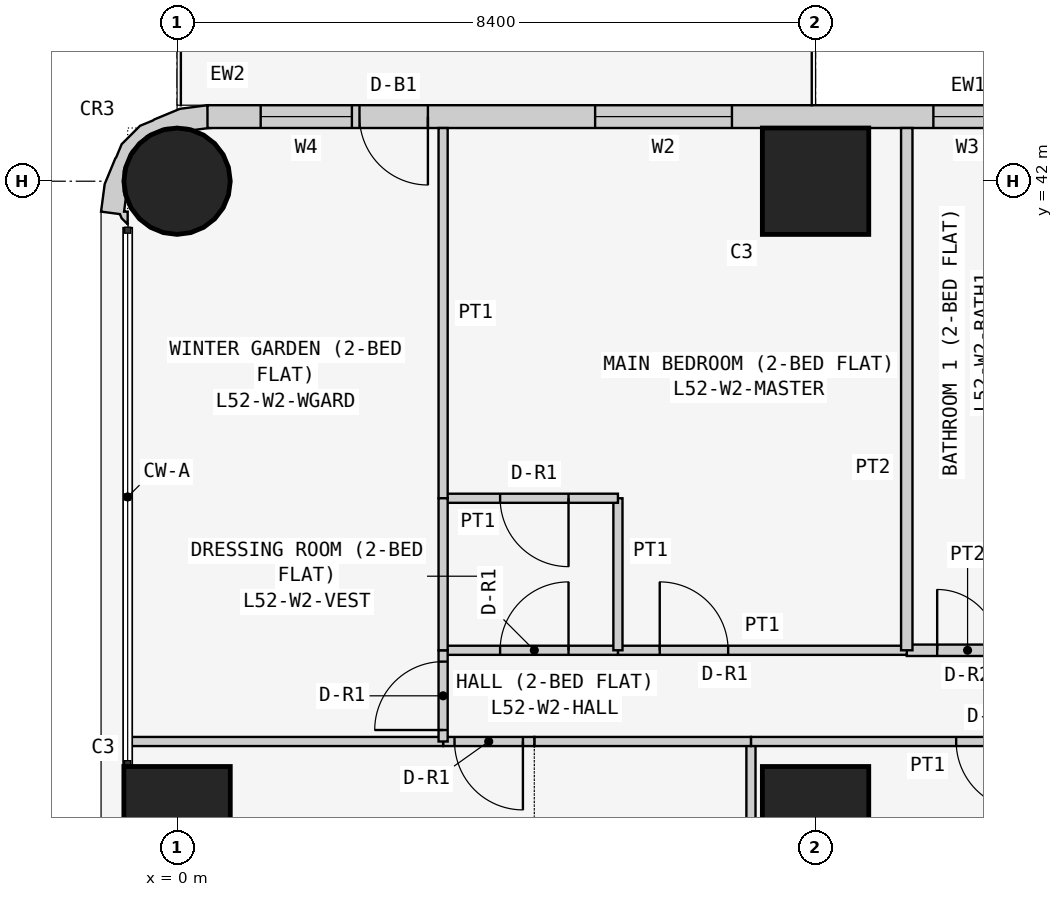
"""IFC4 building model, lengths in metres.
Left out: names, types, materials, properties, quantities, classifications, styles, units other than length and angle.
Written with IfcOpenShell. Run it as: python <this file> out.ifc"""

import sys

from ifc_helpers import new_model, si_unit, direction, frame, frame_2d, origin, origin_2d, place, context, subcontext, project, spatial, polyline, rectangle, circle, outline, extrude, element, fill, save


model = new_model("IFC4")
c1 = context("Model", 3, precision=1e-05, world=origin(), true_north=direction((0.0, 1.0)))
c2 = subcontext(c1, "Body", "Model", "MODEL_VIEW")
j1 = project(units=[si_unit("LENGTHUNIT", "METRE"), si_unit("PLANEANGLEUNIT", "RADIAN")], contexts=[c1])
p1 = place(None, origin())
s1 = spatial("IfcSite", under=j1, at=p1, CompositionType="ELEMENT")
p2 = place(p1, origin())
s2 = spatial("IfcBuilding", under=s1, at=p2, CompositionType="ELEMENT")
p3 = place(p2, frame((0.0, 0.0, 201.3)))
s3 = spatial("IfcBuildingStorey", under=s2, at=p3, CompositionType="ELEMENT", Elevation=201.3)
p4 = place(p3, frame((0.0, 33.6, 0.0), z_axis=(0.0, 0.0, 1.0), x_axis=(1.0, 0.0, 0.0)))
e1 = element("IfcColumn", 1, at=p4, inside=s3, PredefinedType="COLUMN", context=c2, shape_type="SweptSolid", body=[
    extrude(rectangle(XDim=1.4, YDim=1.4, at=origin_2d()), origin(), (0.0, 0.0, 1.0), 3.6),
])
p5 = place(p3, frame((0.0, 42.0, 0.0), z_axis=(0.0, 0.0, 1.0), x_axis=(1.0, 0.0, 0.0)))
e2 = element("IfcColumn", 2, at=p5, inside=s3, PredefinedType="COLUMN", context=c2, shape_type="SweptSolid", body=[
    extrude(circle(Radius=0.7, at=origin_2d()), origin(), (0.0, 0.0, 1.0), 3.6),
])
for number, where, z_axis, x_axis in (
    (3, (8.4, 33.6, 0.0), (0.0, 0.0, 1.0), (1.0, 0.0, 0.0)),
    (4, (8.4, 42.0, 0.0), (0.0, 0.0, 1.0), (1.0, 0.0, 0.0)),
):
    element("IfcColumn", number, at=place(p3, frame(where, z_axis=z_axis, x_axis=x_axis)), inside=s3, PredefinedType="COLUMN", context=c2, shape_type="SweptSolid", body=[
        extrude(rectangle(XDim=1.4, YDim=1.4, at=origin_2d()), origin(), (0.0, 0.0, 1.0), 3.6),
    ])
p6 = place(p3, frame((15.8, 42.85, 0.0), z_axis=(0.0, 0.0, 1.0), x_axis=(-1.0, 0.0, 0.0)))
e5 = element("IfcWall", 5, at=p6, inside=s3, PredefinedType="SOLIDWALL", context=c2, shape_type="SweptSolid", body=[
    extrude(rectangle(XDim=15.4, YDim=0.3, at=frame_2d((7.7, 0.0))), origin(), (0.0, 0.0, 1.0), 3.45),
])
p7 = place(p6, frame((1.2, 0.0, 0.9)))
e6 = element("IfcOpeningElement", 6, at=p7, cuts=e5, PredefinedType="OPENING", context=c2, shape_type="SweptSolid", body=[
    extrude(rectangle(XDim=1.8, YDim=1.5, at=frame_2d((0.9, 0.75))), frame((0.0, 0.16, 0.0), z_axis=(0.0, -1.0, 0.0), x_axis=(1.0, 0.0, 0.0)), (0.0, 0.0, 1.0), 0.32),
])
p8 = place(p6, frame((4.95, 0.0, 1.5)))
e7 = element("IfcOpeningElement", 7, at=p8, cuts=e5, PredefinedType="OPENING", context=c2, shape_type="SweptSolid", body=[
    extrude(rectangle(XDim=0.9, YDim=0.7, at=frame_2d((0.45, 0.35))), frame((0.0, 0.16, 0.0), z_axis=(0.0, -1.0, 0.0), x_axis=(1.0, 0.0, 0.0)), (0.0, 0.0, 1.0), 0.32),
])
p9 = place(p6, frame((8.5, 0.0, 0.9)))
e8 = element("IfcOpeningElement", 8, at=p9, cuts=e5, PredefinedType="OPENING", context=c2, shape_type="SweptSolid", body=[
    extrude(rectangle(XDim=1.8, YDim=1.5, at=frame_2d((0.9, 0.75))), frame((0.0, 0.16, 0.0), z_axis=(0.0, -1.0, 0.0), x_axis=(1.0, 0.0, 0.0)), (0.0, 0.0, 1.0), 0.32),
])
p10 = place(p6, frame((12.5, 0.0, 0.0)))
e9 = element("IfcOpeningElement", 9, at=p10, cuts=e5, PredefinedType="OPENING", context=c2, shape_type="SweptSolid", body=[
    extrude(rectangle(XDim=0.9, YDim=2.4, at=frame_2d((0.45, 1.2))), frame((0.0, 0.16, 0.0), z_axis=(0.0, -1.0, 0.0), x_axis=(1.0, 0.0, 0.0)), (0.0, 0.0, 1.0), 0.32),
])
p11 = place(p6, frame((13.5, 0.0, 0.9)))
e10 = element("IfcOpeningElement", 10, at=p11, cuts=e5, PredefinedType="OPENING", context=c2, shape_type="SweptSolid", body=[
    extrude(rectangle(XDim=1.2, YDim=1.5, at=frame_2d((0.6, 0.75))), frame((0.0, 0.16, 0.0), z_axis=(0.0, -1.0, 0.0), x_axis=(1.0, 0.0, 0.0)), (0.0, 0.0, 1.0), 0.32),
])
p12 = place(p3, frame((0.29, 42.724, 0.0), z_axis=(0.0, 0.0, 1.0), x_axis=(-0.898030234854, 0.439933741929, 0.0)))
e11 = element("IfcWall", 11, at=p12, inside=s3, PredefinedType="SOLIDWALL", context=c2, shape_type="SweptSolid", body=[
    extrude(outline(polyline([(-0.145, -0.044), (0.022, -0.296), (0.327, -0.094), (0.568, 0.18), (0.578, 0.199), (0.7, 0.338), (0.811, 0.661), (0.799, 0.846), (0.803, 0.866), (0.78, 1.231), (0.664, 1.577), (0.426, 1.497), (0.382, 1.536), (0.276, 1.572), (0.349, 1.423), (0.392, 1.444), (0.453, 1.261), (0.51, 1.211), (0.632, 0.961), (0.65, 0.683), (0.56, 0.419), (0.375, 0.21), (0.125, 0.087), (0.05, 0.082), (-0.127, -0.035), (-0.145, -0.044)])), origin(), (0.0, 0.0, 1.0), 3.45),
])
p13 = place(p3, frame((7.55, 29.4, 0.0), z_axis=(0.0, 0.0, 1.0), x_axis=(0.0, 1.0, 0.0)))
e12 = element("IfcWall", 12, at=p13, inside=s3, PredefinedType="PARTITIONING", context=c2, shape_type="SweptSolid", body=[
    extrude(rectangle(XDim=5.229, YDim=0.12, at=frame_2d((2.615, 0.0))), origin(), (0.0, 0.0, 1.0), 3.45),
])
p14 = place(p3, frame((7.55, 34.629, 0.0), z_axis=(0.0, 0.0, 1.0), x_axis=(1.0, 0.0, 0.0)))
e13 = element("IfcWall", 13, at=p14, inside=s3, PredefinedType="PARTITIONING", context=c2, shape_type="SweptSolid", body=[
    extrude(rectangle(XDim=4.65, YDim=0.12, at=frame_2d((2.325, 0.0))), origin(), (0.0, 0.0, 1.0), 3.45),
])
p15 = place(p14, frame((2.7, 0.0, 0.0)))
e14 = element("IfcOpeningElement", 14, at=p15, cuts=e13, PredefinedType="OPENING", context=c2, shape_type="SweptSolid", body=[
    extrude(rectangle(XDim=0.9, YDim=2.1, at=frame_2d((0.45, 1.05))), frame((0.0, 0.07, 0.0), z_axis=(0.0, -1.0, 0.0), x_axis=(1.0, 0.0, 0.0)), (0.0, 0.0, 1.0), 0.14),
])
p16 = place(p3, frame((4.7, 34.629, 0.0), z_axis=(0.0, 0.0, 1.0), x_axis=(1.0, 0.0, 0.0)))
e15 = element("IfcWall", 15, at=p16, inside=s3, PredefinedType="PARTITIONING", context=c2, shape_type="SweptSolid", body=[
    extrude(rectangle(XDim=2.85, YDim=0.12, at=frame_2d((1.425, 0.0))), origin(), (0.0, 0.0, 1.0), 3.45),
])
p17 = place(p3, frame((3.5, 34.629, 0.0), z_axis=(0.0, 0.0, 1.0), x_axis=(1.0, 0.0, 0.0)))
e16 = element("IfcWall", 16, at=p17, inside=s3, PredefinedType="PARTITIONING", context=c2, shape_type="SweptSolid", body=[
    extrude(rectangle(XDim=1.2, YDim=0.12, at=frame_2d((0.6, 0.0))), origin(), (0.0, 0.0, 1.0), 3.45),
])
p18 = place(p17, frame((0.15, 0.0, 0.0)))
e17 = element("IfcOpeningElement", 17, at=p18, cuts=e16, PredefinedType="OPENING", context=c2, shape_type="SweptSolid", body=[
    extrude(rectangle(XDim=0.9, YDim=2.1, at=frame_2d((0.45, 1.05))), frame((0.0, 0.07, 0.0), z_axis=(0.0, -1.0, 0.0), x_axis=(1.0, 0.0, 0.0)), (0.0, 0.0, 1.0), 0.14),
])
p19 = place(p3, frame((-0.65, 34.629, 0.0), z_axis=(0.0, 0.0, 1.0), x_axis=(1.0, 0.0, 0.0)))
e18 = element("IfcWall", 18, at=p19, inside=s3, PredefinedType="PARTITIONING", context=c2, shape_type="SweptSolid", body=[
    extrude(rectangle(XDim=4.15, YDim=0.12, at=frame_2d((2.075, 0.0))), origin(), (0.0, 0.0, 1.0), 3.45),
])
p20 = place(p3, frame((9.6, 35.829, 0.0), z_axis=(0.0, 0.0, 1.0), x_axis=(1.0, 0.0, 0.0)))
e19 = element("IfcWall", 19, at=p20, inside=s3, PredefinedType="PARTITIONING", context=c2, shape_type="SweptSolid", body=[
    extrude(rectangle(XDim=1.6, YDim=0.15, at=frame_2d((0.8, 0.0))), origin(), (0.0, 0.0, 1.0), 3.45),
])
p21 = place(p20, frame((0.4, 0.0, 0.0)))
e20 = element("IfcOpeningElement", 20, at=p21, cuts=e19, PredefinedType="OPENING", context=c2, shape_type="SweptSolid", body=[
    extrude(rectangle(XDim=0.8, YDim=2.1, at=frame_2d((0.4, 1.05))), frame((0.0, 0.085, 0.0), z_axis=(0.0, -1.0, 0.0), x_axis=(1.0, 0.0, 0.0)), (0.0, 0.0, 1.0), 0.17),
])
p22 = place(p3, frame((5.8, 35.829, 0.0), z_axis=(0.0, 0.0, 1.0), x_axis=(1.0, 0.0, 0.0)))
e21 = element("IfcWall", 21, at=p22, inside=s3, PredefinedType="PARTITIONING", context=c2, shape_type="SweptSolid", body=[
    extrude(rectangle(XDim=3.8, YDim=0.12, at=frame_2d((1.9, 0.0))), origin(), (0.0, 0.0, 1.0), 3.45),
])
p23 = place(p22, frame((0.55, 0.0, 0.0)))
e22 = element("IfcOpeningElement", 22, at=p23, cuts=e21, PredefinedType="OPENING", context=c2, shape_type="SweptSolid", body=[
    extrude(rectangle(XDim=0.9, YDim=2.1, at=frame_2d((0.45, 1.05))), frame((0.0, 0.07, 0.0), z_axis=(0.0, -1.0, 0.0), x_axis=(1.0, 0.0, 0.0)), (0.0, 0.0, 1.0), 0.14),
])
p24 = place(p3, frame((3.5, 35.829, 0.0), z_axis=(0.0, 0.0, 1.0), x_axis=(1.0, 0.0, 0.0)))
e23 = element("IfcWall", 23, at=p24, inside=s3, PredefinedType="PARTITIONING", context=c2, shape_type="SweptSolid", body=[
    extrude(rectangle(XDim=2.3, YDim=0.12, at=frame_2d((1.15, 0.0))), origin(), (0.0, 0.0, 1.0), 3.45),
])
p25 = place(p24, frame((0.75, 0.0, 0.0)))
e24 = element("IfcOpeningElement", 24, at=p25, cuts=e23, PredefinedType="OPENING", context=c2, shape_type="SweptSolid", body=[
    extrude(rectangle(XDim=0.9, YDim=2.1, at=frame_2d((0.45, 1.05))), frame((0.0, 0.07, 0.0), z_axis=(0.0, -1.0, 0.0), x_axis=(1.0, 0.0, 0.0)), (0.0, 0.0, 1.0), 0.14),
])
p26 = place(p3, frame((3.5, 34.629, 0.0), z_axis=(0.0, 0.0, 1.0), x_axis=(0.0, 1.0, 0.0)))
e25 = element("IfcWall", 25, at=p26, inside=s3, PredefinedType="PARTITIONING", context=c2, shape_type="SweptSolid", body=[
    extrude(rectangle(XDim=1.2, YDim=0.12, at=frame_2d((0.6, 0.0))), origin(), (0.0, 0.0, 1.0), 3.45),
])
p27 = place(p26, frame((0.151, 0.0, 0.0)))
e26 = element("IfcOpeningElement", 26, at=p27, cuts=e25, PredefinedType="OPENING", context=c2, shape_type="SweptSolid", body=[
    extrude(rectangle(XDim=0.9, YDim=2.1, at=frame_2d((0.45, 1.05))), frame((0.0, 0.07, 0.0), z_axis=(0.0, -1.0, 0.0), x_axis=(1.0, 0.0, 0.0)), (0.0, 0.0, 1.0), 0.14),
])
p28 = place(p3, frame((9.6, 35.829, 0.0), z_axis=(0.0, 0.0, 1.0), x_axis=(0.0, 1.0, 0.0)))
e27 = element("IfcWall", 27, at=p28, inside=s3, PredefinedType="PARTITIONING", context=c2, shape_type="SweptSolid", body=[
    extrude(rectangle(XDim=6.871, YDim=0.15, at=frame_2d((3.436, 0.0))), origin(), (0.0, 0.0, 1.0), 3.45),
])
p29 = place(p3, frame((5.8, 35.829, 0.0), z_axis=(0.0, 0.0, 1.0), x_axis=(0.0, 1.0, 0.0)))
e28 = element("IfcWall", 28, at=p29, inside=s3, PredefinedType="PARTITIONING", context=c2, shape_type="SweptSolid", body=[
    extrude(rectangle(XDim=2.0, YDim=0.12, at=frame_2d((1.0, 0.0))), origin(), (0.0, 0.0, 1.0), 3.45),
])
p30 = place(p3, frame((5.8, 37.829, 0.0), z_axis=(0.0, 0.0, 1.0), x_axis=(-1.0, 0.0, 0.0)))
e29 = element("IfcWall", 29, at=p30, inside=s3, PredefinedType="PARTITIONING", context=c2, shape_type="SweptSolid", body=[
    extrude(rectangle(XDim=2.3, YDim=0.12, at=frame_2d((1.15, 0.0))), origin(), (0.0, 0.0, 1.0), 3.45),
])
p31 = place(p30, frame((0.65, 0.0, 0.0)))
e30 = element("IfcOpeningElement", 30, at=p31, cuts=e29, PredefinedType="OPENING", context=c2, shape_type="SweptSolid", body=[
    extrude(rectangle(XDim=0.9, YDim=2.1, at=frame_2d((0.45, 1.05))), frame((0.0, 0.07, 0.0), z_axis=(0.0, -1.0, 0.0), x_axis=(1.0, 0.0, 0.0)), (0.0, 0.0, 1.0), 0.14),
])
p32 = place(p3, frame((3.5, 37.829, 0.0), z_axis=(0.0, 0.0, 1.0), x_axis=(0.0, 1.0, 0.0)))
e31 = element("IfcWall", 31, at=p32, inside=s3, PredefinedType="PARTITIONING", context=c2, shape_type="SweptSolid", body=[
    extrude(rectangle(XDim=4.871, YDim=0.12, at=frame_2d((2.436, 0.0))), origin(), (0.0, 0.0, 1.0), 3.45),
])
p33 = place(p3, frame((3.5, 35.829, 0.0), z_axis=(0.0, 0.0, 1.0), x_axis=(0.0, 1.0, 0.0)))
e32 = element("IfcWall", 32, at=p33, inside=s3, PredefinedType="PARTITIONING", context=c2, shape_type="SweptSolid", body=[
    extrude(rectangle(XDim=2.0, YDim=0.12, at=frame_2d((1.0, 0.0))), origin(), (0.0, 0.0, 1.0), 3.45),
])
p34 = place(p8, origin())
e33 = element("IfcWindow", 33, at=p34, inside=s3, PartitioningType="SINGLE_PANEL", PredefinedType="WINDOW", context=c2, shape_type="SweptSolid", body=[
    extrude(rectangle(XDim=0.9, YDim=0.7, at=frame_2d((0.45, 0.35))), frame((0.0, 0.03, 0.0), z_axis=(0.0, -1.0, 0.0), x_axis=(1.0, 0.0, 0.0)), (0.0, 0.0, 1.0), 0.06),
])
fill(e7, e33)
p35 = place(p9, origin())
e34 = element("IfcWindow", 34, at=p35, inside=s3, PartitioningType="SINGLE_PANEL", PredefinedType="WINDOW", context=c2, shape_type="SweptSolid", body=[
    extrude(rectangle(XDim=1.8, YDim=1.5, at=frame_2d((0.9, 0.75))), frame((0.0, 0.03, 0.0), z_axis=(0.0, -1.0, 0.0), x_axis=(1.0, 0.0, 0.0)), (0.0, 0.0, 1.0), 0.06),
])
fill(e8, e34)
p36 = place(p10, origin())
e35 = element("IfcDoor", 35, at=p36, inside=s3, OperationType="SINGLE_SWING_LEFT", PredefinedType="DOOR", context=c2, shape_type="SweptSolid", body=[
    extrude(rectangle(XDim=0.9, YDim=2.4, at=frame_2d((0.45, 1.2))), frame((0.0, 0.025, 0.0), z_axis=(0.0, -1.0, 0.0), x_axis=(1.0, 0.0, 0.0)), (0.0, 0.0, 1.0), 0.05),
])
fill(e9, e35)
p37 = place(p11, origin())
e36 = element("IfcWindow", 36, at=p37, inside=s3, PartitioningType="SINGLE_PANEL", PredefinedType="WINDOW", context=c2, shape_type="SweptSolid", body=[
    extrude(rectangle(XDim=1.2, YDim=1.5, at=frame_2d((0.6, 0.75))), frame((0.0, 0.03, 0.0), z_axis=(0.0, -1.0, 0.0), x_axis=(1.0, 0.0, 0.0)), (0.0, 0.0, 1.0), 0.06),
])
fill(e10, e36)
p38 = place(p15, frame((0.9, 0.0, 0.0), z_axis=(0.0, 0.0, 1.0), x_axis=(-1.0, 0.0, 0.0)))
e37 = element("IfcDoor", 37, at=p38, inside=s3, OperationType="SINGLE_SWING_LEFT", PredefinedType="DOOR", context=c2, shape_type="SweptSolid", body=[
    extrude(rectangle(XDim=0.9, YDim=2.1, at=frame_2d((0.45, 1.05))), frame((0.0, 0.025, 0.0), z_axis=(0.0, -1.0, 0.0), x_axis=(1.0, 0.0, 0.0)), (0.0, 0.0, 1.0), 0.05),
])
fill(e14, e37)
p39 = place(p18, frame((0.9, 0.0, 0.0), z_axis=(0.0, 0.0, 1.0), x_axis=(-1.0, 0.0, 0.0)))
e38 = element("IfcDoor", 38, at=p39, inside=s3, OperationType="SINGLE_SWING_LEFT", PredefinedType="DOOR", context=c2, shape_type="SweptSolid", body=[
    extrude(rectangle(XDim=0.9, YDim=2.1, at=frame_2d((0.45, 1.05))), frame((0.0, 0.025, 0.0), z_axis=(0.0, -1.0, 0.0), x_axis=(1.0, 0.0, 0.0)), (0.0, 0.0, 1.0), 0.05),
])
fill(e17, e38)
p40 = place(p21, origin())
e39 = element("IfcDoor", 39, at=p40, inside=s3, OperationType="SINGLE_SWING_LEFT", PredefinedType="DOOR", context=c2, shape_type="SweptSolid", body=[
    extrude(rectangle(XDim=0.8, YDim=2.1, at=frame_2d((0.4, 1.05))), frame((0.0, 0.025, 0.0), z_axis=(0.0, -1.0, 0.0), x_axis=(1.0, 0.0, 0.0)), (0.0, 0.0, 1.0), 0.05),
])
fill(e20, e39)
p41 = place(p23, origin())
e40 = element("IfcDoor", 40, at=p41, inside=s3, OperationType="SINGLE_SWING_LEFT", PredefinedType="DOOR", context=c2, shape_type="SweptSolid", body=[
    extrude(rectangle(XDim=0.9, YDim=2.1, at=frame_2d((0.45, 1.05))), frame((0.0, 0.025, 0.0), z_axis=(0.0, -1.0, 0.0), x_axis=(1.0, 0.0, 0.0)), (0.0, 0.0, 1.0), 0.05),
])
fill(e22, e40)
p42 = place(p25, origin())
e41 = element("IfcDoor", 41, at=p42, inside=s3, OperationType="SINGLE_SWING_RIGHT", PredefinedType="DOOR", context=c2, shape_type="SweptSolid", body=[
    extrude(rectangle(XDim=0.9, YDim=2.1, at=frame_2d((0.45, 1.05))), frame((0.0, 0.025, 0.0), z_axis=(0.0, -1.0, 0.0), x_axis=(1.0, 0.0, 0.0)), (0.0, 0.0, 1.0), 0.05),
])
fill(e24, e41)
p43 = place(p31, origin())
e42 = element("IfcDoor", 42, at=p43, inside=s3, OperationType="SINGLE_SWING_LEFT", PredefinedType="DOOR", context=c2, shape_type="SweptSolid", body=[
    extrude(rectangle(XDim=0.9, YDim=2.1, at=frame_2d((0.45, 1.05))), frame((0.0, 0.025, 0.0), z_axis=(0.0, -1.0, 0.0), x_axis=(1.0, 0.0, 0.0)), (0.0, 0.0, 1.0), 0.05),
])
fill(e30, e42)
p44 = place(p27, origin())
e43 = element("IfcDoor", 43, at=p44, inside=s3, OperationType="SINGLE_SWING_LEFT", PredefinedType="DOOR", context=c2, shape_type="SweptSolid", body=[
    extrude(rectangle(XDim=0.9, YDim=2.1, at=frame_2d((0.45, 1.05))), frame((0.0, 0.025, 0.0), z_axis=(0.0, -1.0, 0.0), x_axis=(1.0, 0.0, 0.0)), (0.0, 0.0, 1.0), 0.05),
])
fill(e26, e43)
save(model, sys.argv[1])
